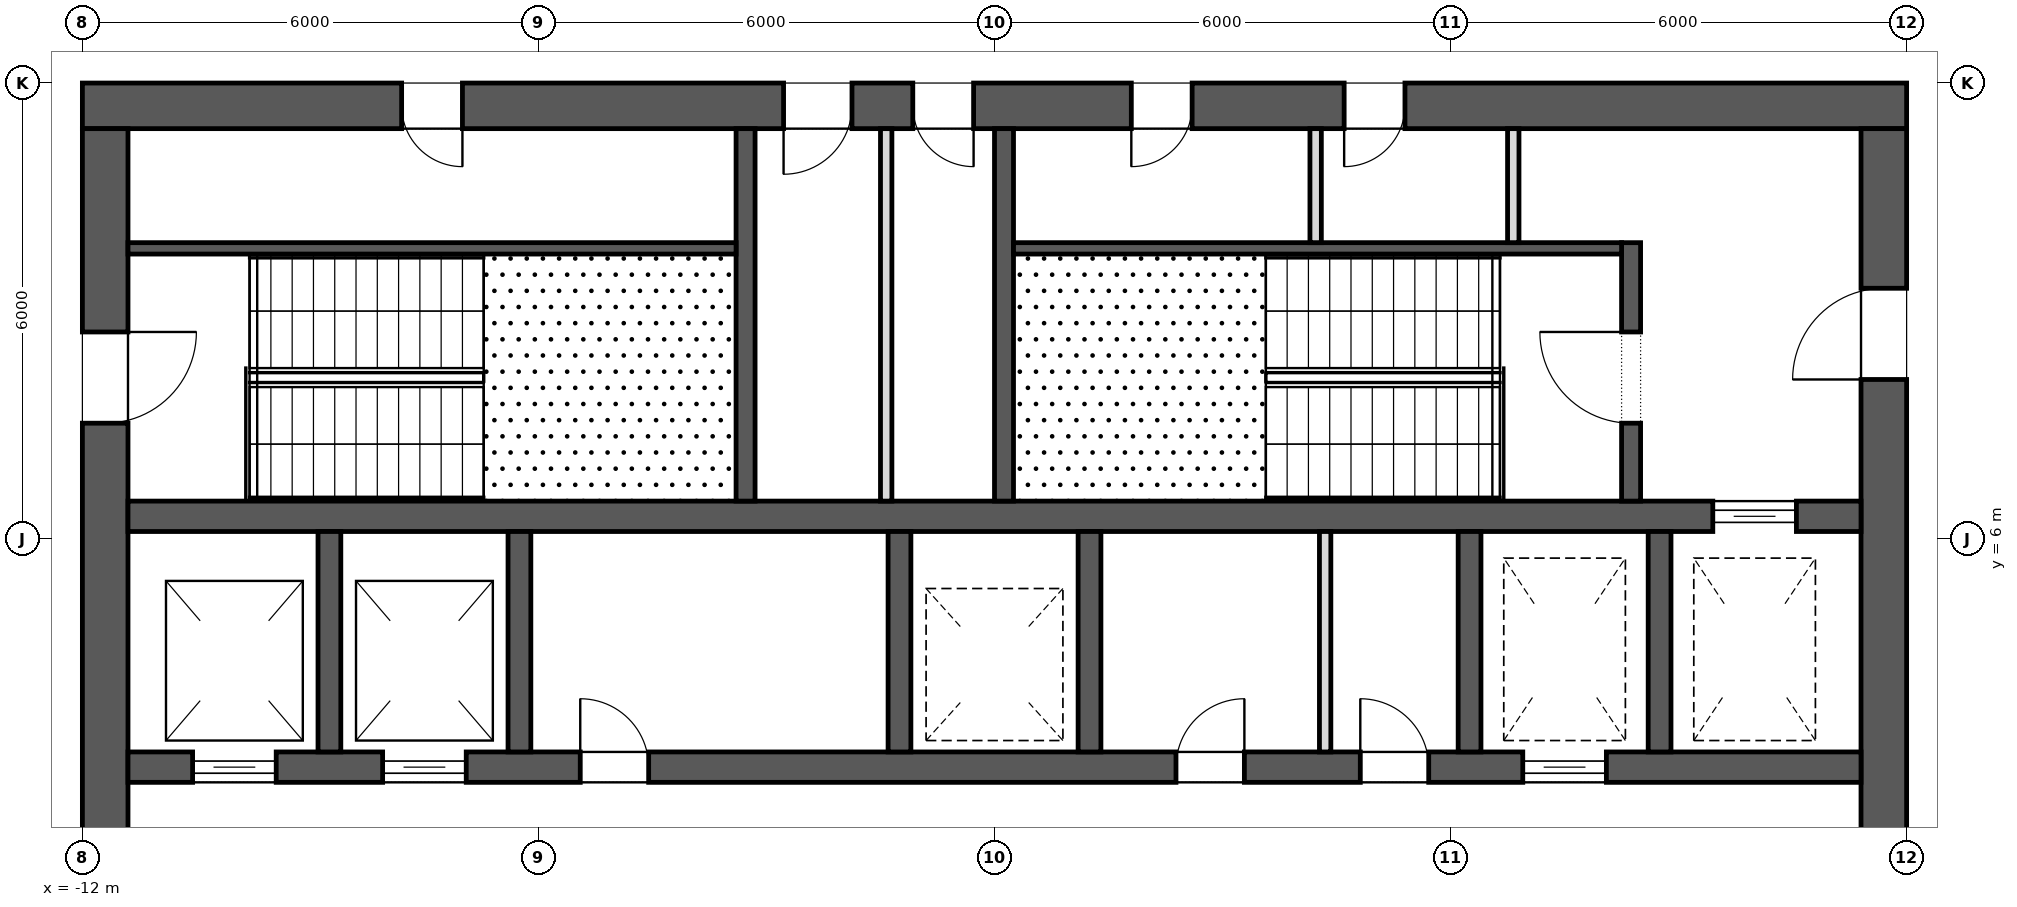
"""IFC4 building model, lengths in metres.
Left out: names, types, materials, properties, quantities, classifications, styles, units other than length and angle.
Written with IfcOpenShell. Run it as: python <this file> out.ifc"""

import sys

from ifc_helpers import new_model, si_unit, direction, frame, frame_2d, origin, place, context, subcontext, project, spatial, rectangle, extrude, element, fill, save


model = new_model("IFC4")
c1 = context("Model", 3, precision=1e-05, world=origin(), true_north=direction((0.0, 1.0)))
c2 = subcontext(c1, "Body", "Model", "MODEL_VIEW")
j1 = project(units=[si_unit("LENGTHUNIT", "METRE"), si_unit("PLANEANGLEUNIT", "RADIAN")], contexts=[c1])
p1 = place(None, origin())
s1 = spatial("IfcSite", under=j1, at=p1, CompositionType="ELEMENT")
p2 = place(p1, origin())
s2 = spatial("IfcBuilding", under=s1, at=p2, CompositionType="ELEMENT")
p3 = place(p2, frame((0.0, 0.0, 264.3)))
s3 = spatial("IfcBuildingStorey", under=s2, at=p3, CompositionType="ELEMENT", Elevation=264.3)
p4 = place(p3, frame((-12.0, 11.7, 0.0), z_axis=(0.0, 0.0, 1.0), x_axis=(1.0, 0.0, 0.0)))
e1 = element("IfcWall", 1, at=p4, inside=s3, PredefinedType="SHEAR", context=c2, shape_type="SweptSolid", body=[
    extrude(rectangle(XDim=24.0, YDim=0.6, at=frame_2d((12.0, 0.0))), origin(), (0.0, 0.0, 1.0), 4.0),
])
p5 = place(p4, frame((9.225, 0.0, 0.0)))
e2 = element("IfcOpeningElement", 2, at=p5, cuts=e1, PredefinedType="OPENING", context=c2, shape_type="SweptSolid", body=[
    extrude(rectangle(XDim=0.9, YDim=2.1, at=frame_2d((0.45, 1.05))), frame((0.0, 0.312, 0.0), z_axis=(0.0, -1.0, 0.0), x_axis=(1.0, 0.0, 0.0)), (0.0, 0.0, 1.0), 0.624),
])
p6 = place(p4, frame((10.925, 0.0, 0.0)))
e3 = element("IfcOpeningElement", 3, at=p6, cuts=e1, PredefinedType="OPENING", context=c2, shape_type="SweptSolid", body=[
    extrude(rectangle(XDim=0.8, YDim=2.1, at=frame_2d((0.4, 1.05))), frame((0.0, 0.312, 0.0), z_axis=(0.0, -1.0, 0.0), x_axis=(1.0, 0.0, 0.0)), (0.0, 0.0, 1.0), 0.624),
])
p7 = place(p4, frame((4.2, 0.0, 0.0)))
e4 = element("IfcOpeningElement", 4, at=p7, cuts=e1, PredefinedType="OPENING", context=c2, shape_type="SweptSolid", body=[
    extrude(rectangle(XDim=0.8, YDim=2.1, at=frame_2d((0.4, 1.05))), frame((0.0, 0.312, 0.0), z_axis=(0.0, -1.0, 0.0), x_axis=(1.0, 0.0, 0.0)), (0.0, 0.0, 1.0), 0.624),
])
p8 = place(p4, frame((13.8, 0.0, 0.0)))
e5 = element("IfcOpeningElement", 5, at=p8, cuts=e1, PredefinedType="OPENING", context=c2, shape_type="SweptSolid", body=[
    extrude(rectangle(XDim=0.8, YDim=2.1, at=frame_2d((0.4, 1.05))), frame((0.0, 0.312, 0.0), z_axis=(0.0, -1.0, 0.0), x_axis=(1.0, 0.0, 0.0)), (0.0, 0.0, 1.0), 0.624),
])
p9 = place(p4, frame((16.6, 0.0, 0.0)))
e6 = element("IfcOpeningElement", 6, at=p9, cuts=e1, PredefinedType="OPENING", context=c2, shape_type="SweptSolid", body=[
    extrude(rectangle(XDim=0.8, YDim=2.1, at=frame_2d((0.4, 1.05))), frame((0.0, 0.312, 0.0), z_axis=(0.0, -1.0, 0.0), x_axis=(1.0, 0.0, 0.0)), (0.0, 0.0, 1.0), 0.624),
])
p10 = place(p3, frame((11.7, -11.4, 0.0), z_axis=(0.0, 0.0, 1.0), x_axis=(0.0, 1.0, 0.0)))
e7 = element("IfcWall", 7, at=p10, inside=s3, PredefinedType="SHEAR", context=c2, shape_type="SweptSolid", body=[
    extrude(rectangle(XDim=22.8, YDim=0.6, at=frame_2d((11.4, 0.0))), origin(), (0.0, 0.0, 1.0), 4.0),
])
p11 = place(p10, frame((10.2, 0.0, 0.0)))
e8 = element("IfcOpeningElement", 8, at=p11, cuts=e7, PredefinedType="OPENING", context=c2, shape_type="SweptSolid", body=[
    extrude(rectangle(XDim=2.4, YDim=2.1, at=frame_2d((1.2, 1.05))), frame((0.0, 0.312, 0.0), z_axis=(0.0, -1.0, 0.0), x_axis=(1.0, 0.0, 0.0)), (0.0, 0.0, 1.0), 0.624),
])
p12 = place(p10, frame((19.5, 0.0, 0.0)))
e9 = element("IfcOpeningElement", 9, at=p12, cuts=e7, PredefinedType="OPENING", context=c2, shape_type="SweptSolid", body=[
    extrude(rectangle(XDim=1.2, YDim=2.1, at=frame_2d((0.6, 1.05))), frame((0.0, 0.312, 0.0), z_axis=(0.0, -1.0, 0.0), x_axis=(1.0, 0.0, 0.0)), (0.0, 0.0, 1.0), 0.624),
])
p13 = place(p10, frame((2.1, 0.0, 0.0)))
e10 = element("IfcOpeningElement", 10, at=p13, cuts=e7, PredefinedType="OPENING", context=c2, shape_type="SweptSolid", body=[
    extrude(rectangle(XDim=1.2, YDim=2.1, at=frame_2d((0.6, 1.05))), frame((0.0, 0.312, 0.0), z_axis=(0.0, -1.0, 0.0), x_axis=(1.0, 0.0, 0.0)), (0.0, 0.0, 1.0), 0.624),
])
p14 = place(p3, frame((-11.7, -11.4, 0.0), z_axis=(0.0, 0.0, 1.0), x_axis=(0.0, 1.0, 0.0)))
e11 = element("IfcWall", 11, at=p14, inside=s3, PredefinedType="SHEAR", context=c2, shape_type="SweptSolid", body=[
    extrude(rectangle(XDim=22.8, YDim=0.6, at=frame_2d((11.4, 0.0))), origin(), (0.0, 0.0, 1.0), 4.0),
])
p15 = place(p14, frame((10.2, 0.0, 0.0)))
e12 = element("IfcOpeningElement", 12, at=p15, cuts=e11, PredefinedType="OPENING", context=c2, shape_type="SweptSolid", body=[
    extrude(rectangle(XDim=2.4, YDim=2.1, at=frame_2d((1.2, 1.05))), frame((0.0, 0.312, 0.0), z_axis=(0.0, -1.0, 0.0), x_axis=(1.0, 0.0, 0.0)), (0.0, 0.0, 1.0), 0.624),
])
p16 = place(p14, frame((18.925, 0.0, 0.0)))
e13 = element("IfcOpeningElement", 13, at=p16, cuts=e11, PredefinedType="OPENING", context=c2, shape_type="SweptSolid", body=[
    extrude(rectangle(XDim=1.2, YDim=2.1, at=frame_2d((0.6, 1.05))), frame((0.0, 0.312, 0.0), z_axis=(0.0, -1.0, 0.0), x_axis=(1.0, 0.0, 0.0)), (0.0, 0.0, 1.0), 0.624),
])
p17 = place(p14, frame((2.675, 0.0, 0.0)))
e14 = element("IfcOpeningElement", 14, at=p17, cuts=e11, PredefinedType="OPENING", context=c2, shape_type="SweptSolid", body=[
    extrude(rectangle(XDim=1.2, YDim=2.1, at=frame_2d((0.6, 1.05))), frame((0.0, 0.312, 0.0), z_axis=(0.0, -1.0, 0.0), x_axis=(1.0, 0.0, 0.0)), (0.0, 0.0, 1.0), 0.624),
])
p18 = place(p3, frame((-11.4, 3.0, 0.0), z_axis=(0.0, 0.0, 1.0), x_axis=(1.0, 0.0, 0.0)))
e15 = element("IfcWall", 15, at=p18, inside=s3, PredefinedType="SHEAR", context=c2, shape_type="SweptSolid", body=[
    extrude(rectangle(XDim=22.8, YDim=0.4, at=frame_2d((11.4, 0.0))), origin(), (0.0, 0.0, 1.0), 4.0),
])
p19 = place(p18, frame((0.85, 0.0, 0.0)))
e16 = element("IfcOpeningElement", 16, at=p19, cuts=e15, PredefinedType="OPENING", context=c2, shape_type="SweptSolid", body=[
    extrude(rectangle(XDim=1.1, YDim=2.1, at=frame_2d((0.55, 1.05))), frame((0.0, 0.212, 0.0), z_axis=(0.0, -1.0, 0.0), x_axis=(1.0, 0.0, 0.0)), (0.0, 0.0, 1.0), 0.424),
])
p20 = place(p18, frame((3.35, 0.0, 0.0)))
e17 = element("IfcOpeningElement", 17, at=p20, cuts=e15, PredefinedType="OPENING", context=c2, shape_type="SweptSolid", body=[
    extrude(rectangle(XDim=1.1, YDim=2.1, at=frame_2d((0.55, 1.05))), frame((0.0, 0.212, 0.0), z_axis=(0.0, -1.0, 0.0), x_axis=(1.0, 0.0, 0.0)), (0.0, 0.0, 1.0), 0.424),
])
p21 = place(p18, frame((18.35, 0.0, 0.0)))
e18 = element("IfcOpeningElement", 18, at=p21, cuts=e15, PredefinedType="OPENING", context=c2, shape_type="SweptSolid", body=[
    extrude(rectangle(XDim=1.1, YDim=2.1, at=frame_2d((0.55, 1.05))), frame((0.0, 0.212, 0.0), z_axis=(0.0, -1.0, 0.0), x_axis=(1.0, 0.0, 0.0)), (0.0, 0.0, 1.0), 0.424),
])
p22 = place(p18, frame((13.788, 0.0, 0.0)))
e19 = element("IfcOpeningElement", 19, at=p22, cuts=e15, PredefinedType="OPENING", context=c2, shape_type="SweptSolid", body=[
    extrude(rectangle(XDim=0.9, YDim=2.1, at=frame_2d((0.45, 1.05))), frame((0.0, 0.212, 0.0), z_axis=(0.0, -1.0, 0.0), x_axis=(1.0, 0.0, 0.0)), (0.0, 0.0, 1.0), 0.424),
])
p23 = place(p18, frame((16.212, 0.0, 0.0)))
e20 = element("IfcOpeningElement", 20, at=p23, cuts=e15, PredefinedType="OPENING", context=c2, shape_type="SweptSolid", body=[
    extrude(rectangle(XDim=0.9, YDim=2.1, at=frame_2d((0.45, 1.05))), frame((0.0, 0.212, 0.0), z_axis=(0.0, -1.0, 0.0), x_axis=(1.0, 0.0, 0.0)), (0.0, 0.0, 1.0), 0.424),
])
p24 = place(p18, frame((5.95, 0.0, 0.0)))
e21 = element("IfcOpeningElement", 21, at=p24, cuts=e15, PredefinedType="OPENING", context=c2, shape_type="SweptSolid", body=[
    extrude(rectangle(XDim=0.9, YDim=2.1, at=frame_2d((0.45, 1.05))), frame((0.0, 0.212, 0.0), z_axis=(0.0, -1.0, 0.0), x_axis=(1.0, 0.0, 0.0)), (0.0, 0.0, 1.0), 0.424),
])
p25 = place(p3, frame((-11.4, 6.3, 0.0), z_axis=(0.0, 0.0, 1.0), x_axis=(1.0, 0.0, 0.0)))
e22 = element("IfcWall", 22, at=p25, inside=s3, PredefinedType="SHEAR", context=c2, shape_type="SweptSolid", body=[
    extrude(rectangle(XDim=22.8, YDim=0.4, at=frame_2d((11.4, 0.0))), origin(), (0.0, 0.0, 1.0), 4.0),
])
p26 = place(p25, frame((20.85, 0.0, 0.0)))
e23 = element("IfcOpeningElement", 23, at=p26, cuts=e22, PredefinedType="OPENING", context=c2, shape_type="SweptSolid", body=[
    extrude(rectangle(XDim=1.1, YDim=2.1, at=frame_2d((0.55, 1.05))), frame((0.0, 0.212, 0.0), z_axis=(0.0, -1.0, 0.0), x_axis=(1.0, 0.0, 0.0)), (0.0, 0.0, 1.0), 0.424),
])
for number, where, z_axis, x_axis in (
    (24, (-8.75, 3.2, 0.0), (0.0, 0.0, 1.0), (0.0, 1.0, 0.0)),
    (25, (-6.25, 3.2, 0.0), (0.0, 0.0, 1.0), (0.0, 1.0, 0.0)),
    (26, (-1.25, 3.2, 0.0), (0.0, 0.0, 1.0), (0.0, 1.0, 0.0)),
    (27, (1.25, 3.2, 0.0), (0.0, 0.0, 1.0), (0.0, 1.0, 0.0)),
    (28, (6.25, 3.2, 0.0), (0.0, 0.0, 1.0), (0.0, 1.0, 0.0)),
    (29, (8.75, 3.2, 0.0), (0.0, 0.0, 1.0), (0.0, 1.0, 0.0)),
):
    element("IfcWall", number, at=place(p3, frame(where, z_axis=z_axis, x_axis=x_axis)), inside=s3, PredefinedType="SHEAR", context=c2, shape_type="SweptSolid", body=[
        extrude(rectangle(XDim=2.9, YDim=0.3, at=frame_2d((1.45, 0.0))), origin(), (0.0, 0.0, 1.0), 4.0),
    ])
for number, where, z_axis, x_axis in (
    (30, (-3.275, 6.5, 0.0), (0.0, 0.0, 1.0), (0.0, 1.0, 0.0)),
    (31, (0.125, 6.5, 0.0), (0.0, 0.0, 1.0), (0.0, 1.0, 0.0)),
):
    element("IfcWall", number, at=place(p3, frame(where, z_axis=z_axis, x_axis=x_axis)), inside=s3, PredefinedType="SHEAR", context=c2, shape_type="SweptSolid", body=[
        extrude(rectangle(XDim=4.9, YDim=0.25, at=frame_2d((2.45, 0.0))), origin(), (0.0, 0.0, 1.0), 3.7),
    ])
p27 = place(p3, frame((8.375, 6.5, 0.0), z_axis=(0.0, 0.0, 1.0), x_axis=(0.0, 1.0, 0.0)))
e32 = element("IfcWall", 32, at=p27, inside=s3, PredefinedType="SHEAR", context=c2, shape_type="SweptSolid", body=[
    extrude(rectangle(XDim=3.4, YDim=0.25, at=frame_2d((1.7, 0.0))), origin(), (0.0, 0.0, 1.0), 3.7),
])
p28 = place(p27, frame((1.025, 0.0, 0.0)))
e33 = element("IfcOpeningElement", 33, at=p28, cuts=e32, PredefinedType="OPENING", context=c2, shape_type="SweptSolid", body=[
    extrude(rectangle(XDim=1.2, YDim=2.1, at=frame_2d((0.6, 1.05))), frame((0.0, 0.137, 0.0), z_axis=(0.0, -1.0, 0.0), x_axis=(1.0, 0.0, 0.0)), (0.0, 0.0, 1.0), 0.274),
])
for number, where, z_axis, x_axis in (
    (34, (-11.4, 9.825, 0.0), (0.0, 0.0, 1.0), (1.0, 0.0, 0.0)),
    (35, (0.25, 9.825, 0.0), (0.0, 0.0, 1.0), (1.0, 0.0, 0.0)),
):
    element("IfcWall", number, at=place(p3, frame(where, z_axis=z_axis, x_axis=x_axis)), inside=s3, PredefinedType="SHEAR", context=c2, shape_type="SweptSolid", body=[
        extrude(rectangle(XDim=8.0, YDim=0.15, at=frame_2d((4.0, 0.0))), origin(), (0.0, 0.0, 1.0), 3.7),
    ])
p29 = place(p3, frame((-1.425, 6.5, 0.0), z_axis=(0.0, 0.0, 1.0), x_axis=(0.0, 1.0, 0.0)))
e36 = element("IfcWall", 36, at=p29, inside=s3, PredefinedType="PARTITIONING", context=c2, shape_type="SweptSolid", body=[
    extrude(rectangle(XDim=4.9, YDim=0.15, at=frame_2d((2.45, 0.0))), origin(), (0.0, 0.0, 1.0), 3.7),
])
for number, where, z_axis, x_axis in (
    (37, (4.225, 9.9, 0.0), (0.0, 0.0, 1.0), (0.0, 1.0, 0.0)),
    (38, (6.825, 9.9, 0.0), (0.0, 0.0, 1.0), (0.0, 1.0, 0.0)),
):
    element("IfcWall", number, at=place(p3, frame(where, z_axis=z_axis, x_axis=x_axis)), inside=s3, PredefinedType="PARTITIONING", context=c2, shape_type="SweptSolid", body=[
        extrude(rectangle(XDim=1.5, YDim=0.15, at=frame_2d((0.75, 0.0))), origin(), (0.0, 0.0, 1.0), 3.7),
    ])
p30 = place(p3, frame((4.35, 3.2, 0.0), z_axis=(0.0, 0.0, 1.0), x_axis=(0.0, 1.0, 0.0)))
e39 = element("IfcWall", 39, at=p30, inside=s3, PredefinedType="PARTITIONING", context=c2, shape_type="SweptSolid", body=[
    extrude(rectangle(XDim=2.9, YDim=0.15, at=frame_2d((1.45, 0.0))), origin(), (0.0, 0.0, 1.0), 3.7),
])
p31 = place(p26, origin())
e40 = element("IfcDoor", 40, at=p31, inside=s3, OperationType="SLIDING_TO_LEFT", PredefinedType="DOOR", context=c2, shape_type="SweptSolid", body=[
    extrude(rectangle(XDim=1.1, YDim=2.1, at=frame_2d((0.55, 1.05))), frame((0.0, 0.025, 0.0), z_axis=(0.0, -1.0, 0.0), x_axis=(1.0, 0.0, 0.0)), (0.0, 0.0, 1.0), 0.05),
])
fill(e23, e40)
p32 = place(p19, origin())
e41 = element("IfcDoor", 41, at=p32, inside=s3, OperationType="SLIDING_TO_LEFT", PredefinedType="DOOR", context=c2, shape_type="SweptSolid", body=[
    extrude(rectangle(XDim=1.1, YDim=2.1, at=frame_2d((0.55, 1.05))), frame((0.0, 0.025, 0.0), z_axis=(0.0, -1.0, 0.0), x_axis=(1.0, 0.0, 0.0)), (0.0, 0.0, 1.0), 0.05),
])
fill(e16, e41)
p33 = place(p20, origin())
e42 = element("IfcDoor", 42, at=p33, inside=s3, OperationType="SLIDING_TO_LEFT", PredefinedType="DOOR", context=c2, shape_type="SweptSolid", body=[
    extrude(rectangle(XDim=1.1, YDim=2.1, at=frame_2d((0.55, 1.05))), frame((0.0, 0.025, 0.0), z_axis=(0.0, -1.0, 0.0), x_axis=(1.0, 0.0, 0.0)), (0.0, 0.0, 1.0), 0.05),
])
fill(e17, e42)
p34 = place(p21, origin())
e43 = element("IfcDoor", 43, at=p34, inside=s3, OperationType="SLIDING_TO_LEFT", PredefinedType="DOOR", context=c2, shape_type="SweptSolid", body=[
    extrude(rectangle(XDim=1.1, YDim=2.1, at=frame_2d((0.55, 1.05))), frame((0.0, 0.025, 0.0), z_axis=(0.0, -1.0, 0.0), x_axis=(1.0, 0.0, 0.0)), (0.0, 0.0, 1.0), 0.05),
])
fill(e18, e43)
p35 = place(p16, frame((1.2, 0.0, 0.0), z_axis=(0.0, 0.0, 1.0), x_axis=(-1.0, 0.0, 0.0)))
e44 = element("IfcDoor", 44, at=p35, inside=s3, OperationType="SINGLE_SWING_RIGHT", PredefinedType="DOOR", context=c2, shape_type="SweptSolid", body=[
    extrude(rectangle(XDim=1.2, YDim=2.1, at=frame_2d((0.6, 1.05))), frame((0.0, 0.025, 0.0), z_axis=(0.0, -1.0, 0.0), x_axis=(1.0, 0.0, 0.0)), (0.0, 0.0, 1.0), 0.05),
])
fill(e13, e44)
p36 = place(p28, origin())
e45 = element("IfcDoor", 45, at=p36, inside=s3, OperationType="SINGLE_SWING_LEFT", PredefinedType="DOOR", context=c2, shape_type="SweptSolid", body=[
    extrude(rectangle(XDim=1.2, YDim=2.1, at=frame_2d((0.6, 1.05))), frame((0.0, 0.025, 0.0), z_axis=(0.0, -1.0, 0.0), x_axis=(1.0, 0.0, 0.0)), (0.0, 0.0, 1.0), 0.05),
])
fill(e33, e45)
p37 = place(p12, origin())
e46 = element("IfcDoor", 46, at=p37, inside=s3, OperationType="SINGLE_SWING_RIGHT", PredefinedType="DOOR", context=c2, shape_type="SweptSolid", body=[
    extrude(rectangle(XDim=1.2, YDim=2.1, at=frame_2d((0.6, 1.05))), frame((0.0, 0.025, 0.0), z_axis=(0.0, -1.0, 0.0), x_axis=(1.0, 0.0, 0.0)), (0.0, 0.0, 1.0), 0.05),
])
fill(e9, e46)
p38 = place(p5, frame((0.9, 0.0, 0.0), z_axis=(0.0, 0.0, 1.0), x_axis=(-1.0, 0.0, 0.0)))
e47 = element("IfcDoor", 47, at=p38, inside=s3, OperationType="SINGLE_SWING_LEFT", PredefinedType="DOOR", context=c2, shape_type="SweptSolid", body=[
    extrude(rectangle(XDim=0.9, YDim=2.1, at=frame_2d((0.45, 1.05))), frame((0.0, 0.025, 0.0), z_axis=(0.0, -1.0, 0.0), x_axis=(1.0, 0.0, 0.0)), (0.0, 0.0, 1.0), 0.05),
])
fill(e2, e47)
p39 = place(p6, frame((0.8, 0.0, 0.0), z_axis=(0.0, 0.0, 1.0), x_axis=(-1.0, 0.0, 0.0)))
e48 = element("IfcDoor", 48, at=p39, inside=s3, OperationType="SINGLE_SWING_RIGHT", PredefinedType="DOOR", context=c2, shape_type="SweptSolid", body=[
    extrude(rectangle(XDim=0.8, YDim=2.1, at=frame_2d((0.4, 1.05))), frame((0.0, 0.025, 0.0), z_axis=(0.0, -1.0, 0.0), x_axis=(1.0, 0.0, 0.0)), (0.0, 0.0, 1.0), 0.05),
])
fill(e3, e48)
p40 = place(p7, frame((0.8, 0.0, 0.0), z_axis=(0.0, 0.0, 1.0), x_axis=(-1.0, 0.0, 0.0)))
e49 = element("IfcDoor", 49, at=p40, inside=s3, OperationType="SINGLE_SWING_RIGHT", PredefinedType="DOOR", context=c2, shape_type="SweptSolid", body=[
    extrude(rectangle(XDim=0.8, YDim=2.1, at=frame_2d((0.4, 1.05))), frame((0.0, 0.025, 0.0), z_axis=(0.0, -1.0, 0.0), x_axis=(1.0, 0.0, 0.0)), (0.0, 0.0, 1.0), 0.05),
])
fill(e4, e49)
p41 = place(p8, frame((0.8, 0.0, 0.0), z_axis=(0.0, 0.0, 1.0), x_axis=(-1.0, 0.0, 0.0)))
e50 = element("IfcDoor", 50, at=p41, inside=s3, OperationType="SINGLE_SWING_LEFT", PredefinedType="DOOR", context=c2, shape_type="SweptSolid", body=[
    extrude(rectangle(XDim=0.8, YDim=2.1, at=frame_2d((0.4, 1.05))), frame((0.0, 0.025, 0.0), z_axis=(0.0, -1.0, 0.0), x_axis=(1.0, 0.0, 0.0)), (0.0, 0.0, 1.0), 0.05),
])
fill(e5, e50)
p42 = place(p9, frame((0.8, 0.0, 0.0), z_axis=(0.0, 0.0, 1.0), x_axis=(-1.0, 0.0, 0.0)))
e51 = element("IfcDoor", 51, at=p42, inside=s3, OperationType="SINGLE_SWING_LEFT", PredefinedType="DOOR", context=c2, shape_type="SweptSolid", body=[
    extrude(rectangle(XDim=0.8, YDim=2.1, at=frame_2d((0.4, 1.05))), frame((0.0, 0.025, 0.0), z_axis=(0.0, -1.0, 0.0), x_axis=(1.0, 0.0, 0.0)), (0.0, 0.0, 1.0), 0.05),
])
fill(e6, e51)
p43 = place(p22, origin())
e52 = element("IfcDoor", 52, at=p43, inside=s3, OperationType="SINGLE_SWING_LEFT", PredefinedType="DOOR", context=c2, shape_type="SweptSolid", body=[
    extrude(rectangle(XDim=0.9, YDim=2.1, at=frame_2d((0.45, 1.05))), frame((0.0, 0.025, 0.0), z_axis=(0.0, -1.0, 0.0), x_axis=(1.0, 0.0, 0.0)), (0.0, 0.0, 1.0), 0.05),
])
fill(e19, e52)
p44 = place(p23, origin())
e53 = element("IfcDoor", 53, at=p44, inside=s3, OperationType="SINGLE_SWING_RIGHT", PredefinedType="DOOR", context=c2, shape_type="SweptSolid", body=[
    extrude(rectangle(XDim=0.9, YDim=2.1, at=frame_2d((0.45, 1.05))), frame((0.0, 0.025, 0.0), z_axis=(0.0, -1.0, 0.0), x_axis=(1.0, 0.0, 0.0)), (0.0, 0.0, 1.0), 0.05),
])
fill(e20, e53)
p45 = place(p24, origin())
e54 = element("IfcDoor", 54, at=p45, inside=s3, OperationType="SINGLE_SWING_RIGHT", PredefinedType="DOOR", context=c2, shape_type="SweptSolid", body=[
    extrude(rectangle(XDim=0.9, YDim=2.1, at=frame_2d((0.45, 1.05))), frame((0.0, 0.025, 0.0), z_axis=(0.0, -1.0, 0.0), x_axis=(1.0, 0.0, 0.0)), (0.0, 0.0, 1.0), 0.05),
])
fill(e21, e54)
save(model, sys.argv[1])
